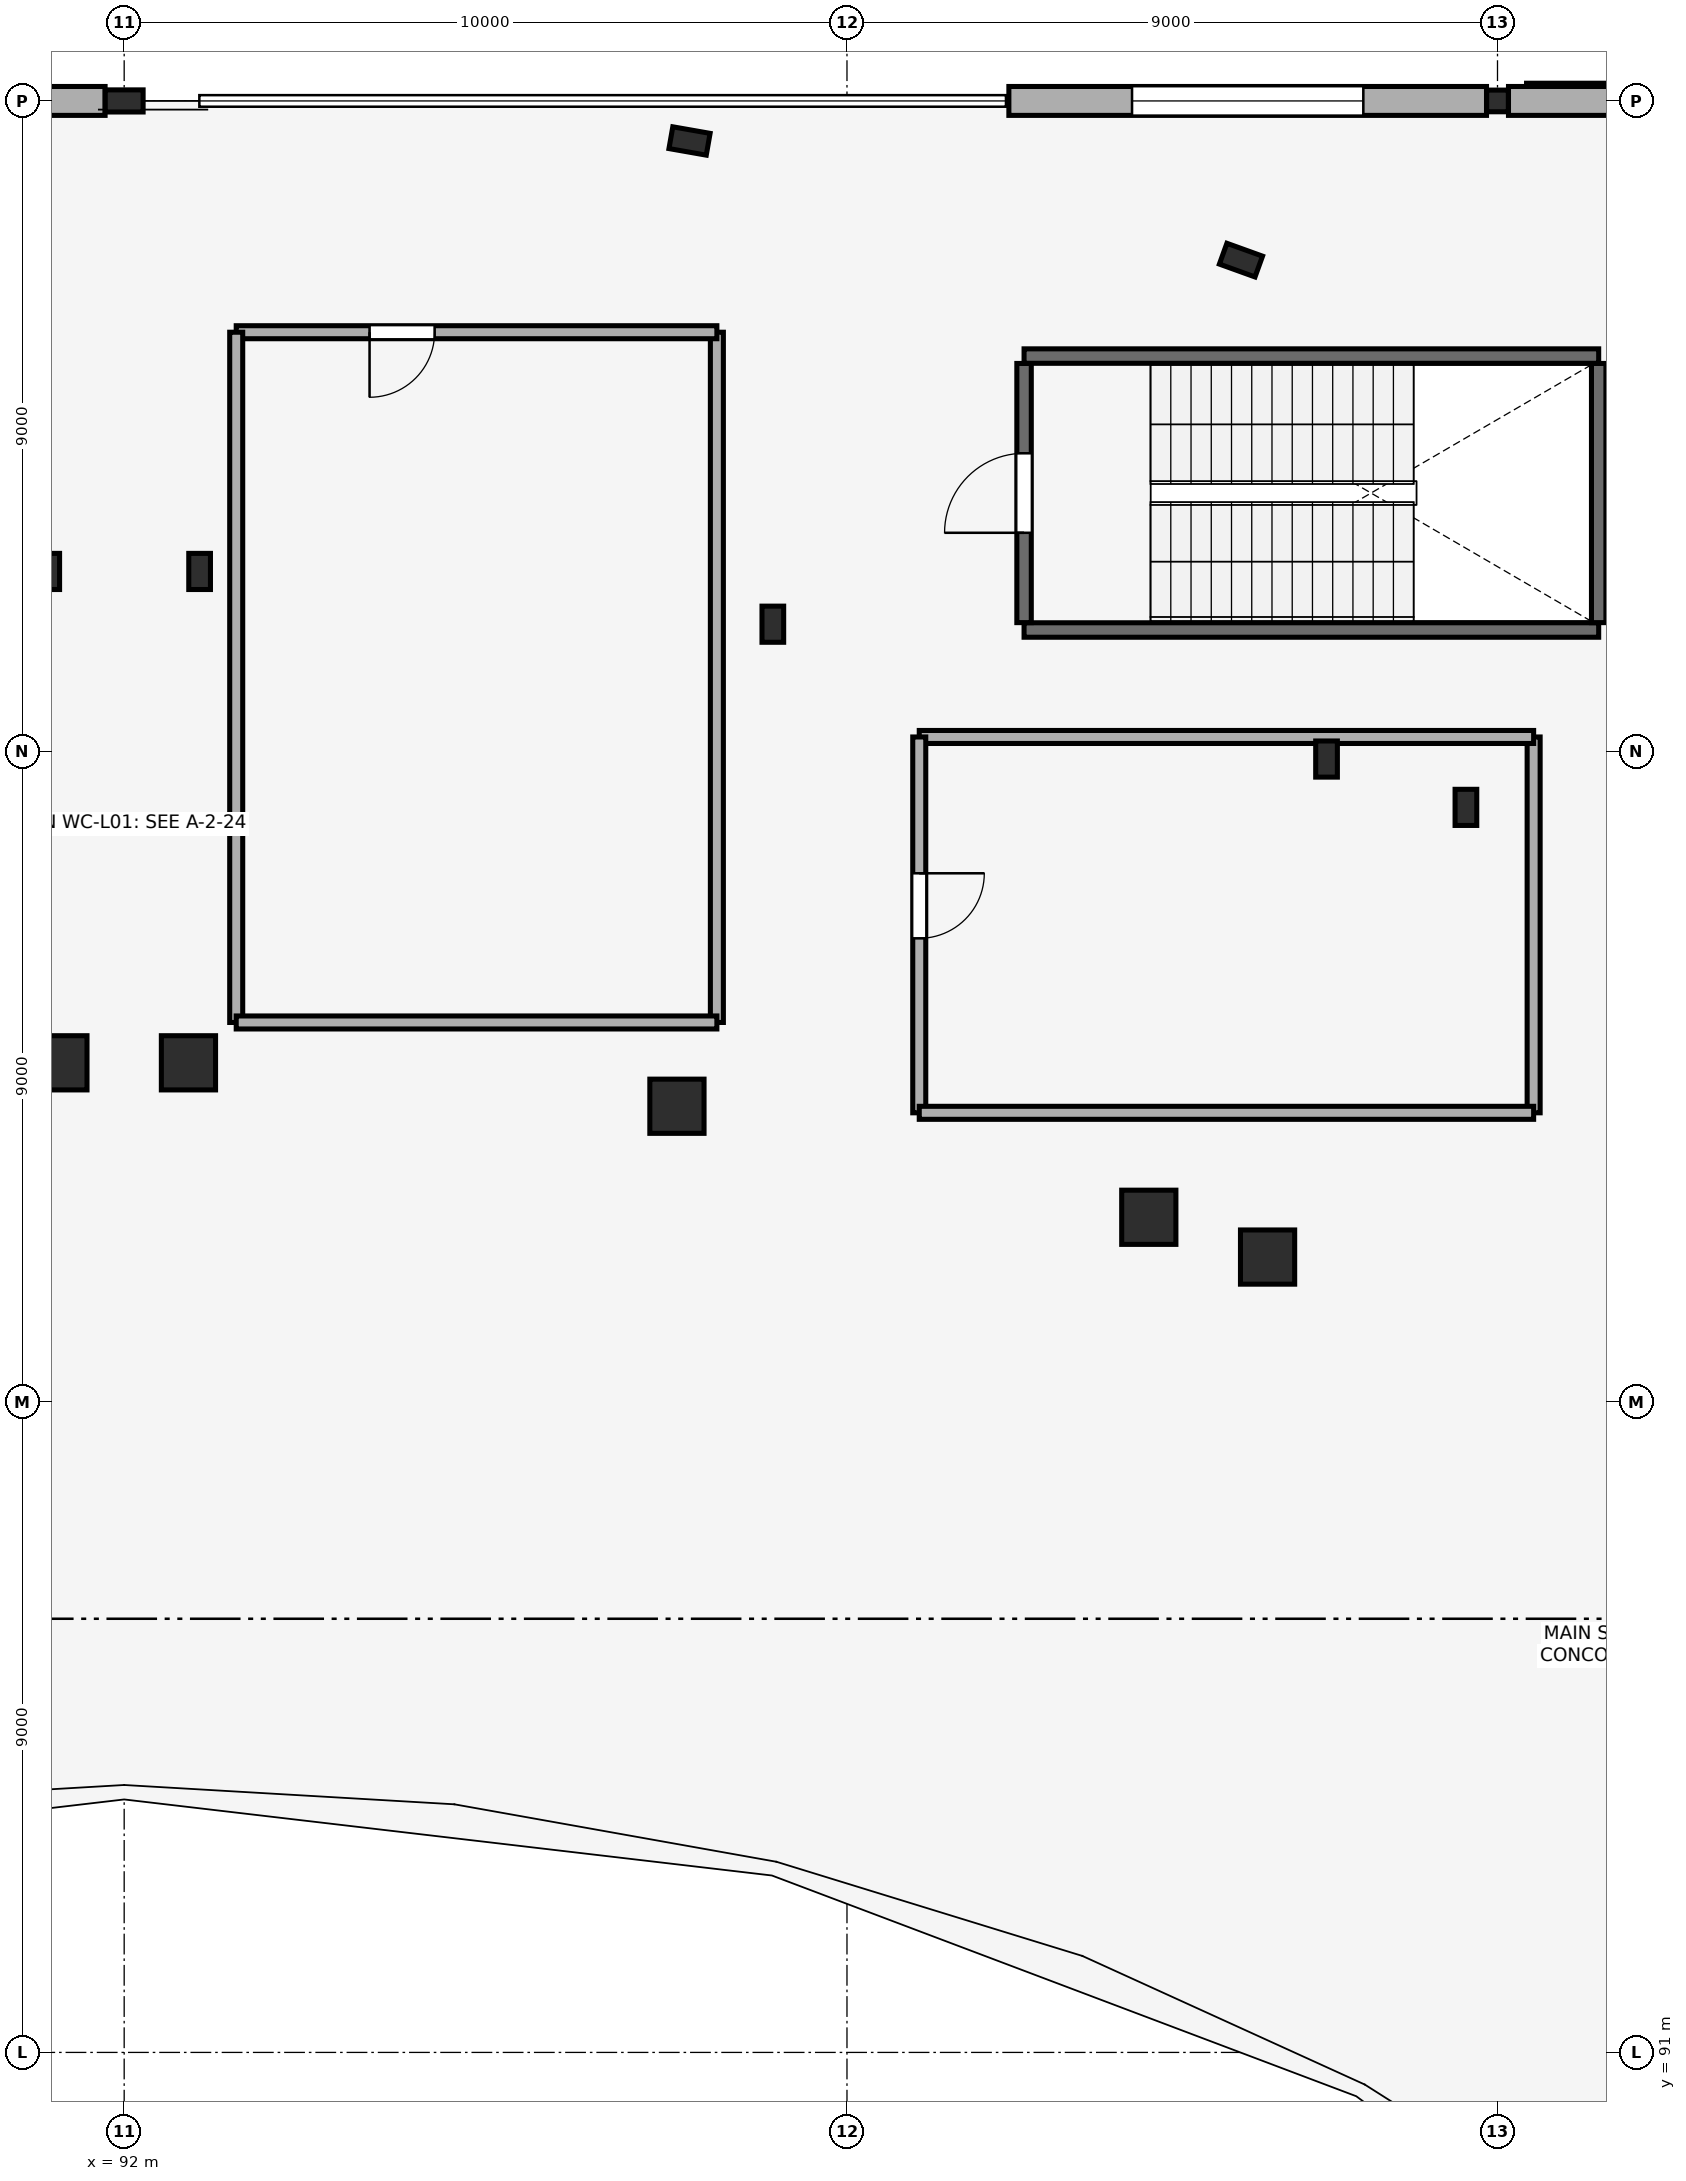
"""IFC4 building model, lengths in metres.
Left out: names, types, materials, properties, quantities, classifications, styles, units other than length and angle.
Written with IfcOpenShell. Run it as: python <this file> out.ifc"""

import sys

from ifc_helpers import new_model, si_unit, direction, frame, frame_2d, origin, origin_2d, place, context, subcontext, project, spatial, rectangle, hollow_rectangle, i_section, extrude, element, fill, save


model = new_model("IFC4")
c1 = context("Model", 3, precision=1e-05, world=origin(), true_north=direction((0.0, 1.0)))
c2 = subcontext(c1, "Body", "Model", "MODEL_VIEW")
j1 = project(units=[si_unit("LENGTHUNIT", "METRE"), si_unit("PLANEANGLEUNIT", "RADIAN")], contexts=[c1])
p1 = place(None, origin())
s1 = spatial("IfcSite", under=j1, at=p1, CompositionType="ELEMENT")
p2 = place(p1, origin())
s2 = spatial("IfcBuilding", under=s1, at=p2, CompositionType="ELEMENT")
p3 = place(p2, frame((0.0, 0.0, 5.4)))
s3 = spatial("IfcBuildingStorey", under=s2, at=p3, CompositionType="ELEMENT", Elevation=5.4)
for number, where, z_axis, x_axis in (
    (1, (107.451, 115.798, 0.0), (0.0, 0.0, 1.0), (0.34, 0.941, 0.0)),
    (2, (99.822, 117.446, 0.0), (0.0, 0.0, 1.0), (0.173, 0.985, 0.0)),
    (3, (92.0, 118.0, 0.0), (0.0, 0.0, 1.0), (0.0, 1.0, 0.0)),
):
    element("IfcColumn", number, at=place(p3, frame(where, z_axis=z_axis, x_axis=x_axis)), inside=s3, PredefinedType="COLUMN", context=c2, shape_type="SweptSolid", body=[
        extrude(i_section(OverallWidth=0.306, OverallDepth=0.524, WebThickness=0.021, FlangeThickness=0.04, FilletRadius=0.027, at=origin_2d()), origin(), (0.0, 0.0, 1.0), 4.8),
    ])
p4 = place(p3, frame((107.819, 102.004, 0.0), z_axis=(0.0, 0.0, 1.0), x_axis=(1.0, 0.0, 0.0)))
e4 = element("IfcColumn", 4, at=p4, inside=s3, PredefinedType="COLUMN", context=c2, shape_type="SweptSolid", body=[
    extrude(rectangle(XDim=0.75, YDim=0.75, at=origin_2d()), origin(), (0.0, 0.0, 1.0), 4.8),
])
p5 = place(p3, frame((110.563, 108.226, 0.0), z_axis=(0.0, 0.0, 1.0), x_axis=(1.0, 0.0, 0.0)))
e5 = element("IfcColumn", 5, at=p5, inside=s3, PredefinedType="COLUMN", context=c2, shape_type="SweptSolid", body=[
    extrude(i_section(OverallWidth=0.3, OverallDepth=0.5, WebThickness=0.014, FlangeThickness=0.028, FilletRadius=0.027, at=origin_2d()), origin(), (0.0, 0.0, 1.0), 4.8),
])
p6 = place(p3, frame((106.176, 102.555, 0.0), z_axis=(0.0, 0.0, 1.0), x_axis=(1.0, 0.0, 0.0)))
e6 = element("IfcColumn", 6, at=p6, inside=s3, PredefinedType="COLUMN", context=c2, shape_type="SweptSolid", body=[
    extrude(rectangle(XDim=0.75, YDim=0.75, at=origin_2d()), origin(), (0.0, 0.0, 1.0), 4.8),
])
p7 = place(p3, frame((108.635, 108.895, 0.0), z_axis=(0.0, 0.0, 1.0), x_axis=(1.0, 0.0, 0.0)))
e7 = element("IfcColumn", 7, at=p7, inside=s3, PredefinedType="COLUMN", context=c2, shape_type="SweptSolid", body=[
    extrude(i_section(OverallWidth=0.3, OverallDepth=0.5, WebThickness=0.014, FlangeThickness=0.028, FilletRadius=0.027, at=origin_2d()), origin(), (0.0, 0.0, 1.0), 4.8),
])
p8 = place(p3, frame((92.889, 104.692, 0.0), z_axis=(0.0, 0.0, 1.0), x_axis=(1.0, 0.0, 0.0)))
e8 = element("IfcColumn", 8, at=p8, inside=s3, PredefinedType="COLUMN", context=c2, shape_type="SweptSolid", body=[
    extrude(rectangle(XDim=0.75, YDim=0.75, at=origin_2d()), origin(), (0.0, 0.0, 1.0), 4.8),
])
p9 = place(p3, frame((93.044, 111.49, 0.0), z_axis=(0.0, 0.0, 1.0), x_axis=(1.0, 0.0, 0.0)))
e9 = element("IfcColumn", 9, at=p9, inside=s3, PredefinedType="COLUMN", context=c2, shape_type="SweptSolid", body=[
    extrude(i_section(OverallWidth=0.3, OverallDepth=0.5, WebThickness=0.014, FlangeThickness=0.028, FilletRadius=0.027, at=origin_2d()), origin(), (0.0, 0.0, 1.0), 4.8),
])
p10 = place(p3, frame((91.111, 104.692, 0.0), z_axis=(0.0, 0.0, 1.0), x_axis=(1.0, 0.0, 0.0)))
e10 = element("IfcColumn", 10, at=p10, inside=s3, PredefinedType="COLUMN", context=c2, shape_type="SweptSolid", body=[
    extrude(rectangle(XDim=0.75, YDim=0.75, at=origin_2d()), origin(), (0.0, 0.0, 1.0), 4.8),
])
p11 = place(p3, frame((90.956, 111.49, 0.0), z_axis=(0.0, 0.0, 1.0), x_axis=(1.0, 0.0, 0.0)))
e11 = element("IfcColumn", 11, at=p11, inside=s3, PredefinedType="COLUMN", context=c2, shape_type="SweptSolid", body=[
    extrude(i_section(OverallWidth=0.3, OverallDepth=0.5, WebThickness=0.014, FlangeThickness=0.028, FilletRadius=0.027, at=origin_2d()), origin(), (0.0, 0.0, 1.0), 4.8),
])
p12 = place(p3, frame((111.0, 118.0, 0.0), z_axis=(0.0, 0.0, 1.0), x_axis=(1.0, 0.0, 0.0)))
e12 = element("IfcColumn", 12, at=p12, inside=s3, PredefinedType="COLUMN", context=c2, shape_type="SweptSolid", body=[
    extrude(hollow_rectangle(XDim=0.3, YDim=0.3, WallThickness=0.012, at=origin_2d()), origin(), (0.0, 0.0, 1.0), 4.8),
])
p13 = place(p3, frame((99.647, 104.091, 0.0), z_axis=(0.0, 0.0, 1.0), x_axis=(1.0, 0.0, 0.0)))
e13 = element("IfcColumn", 13, at=p13, inside=s3, PredefinedType="COLUMN", context=c2, shape_type="SweptSolid", body=[
    extrude(rectangle(XDim=0.75, YDim=0.75, at=origin_2d()), origin(), (0.0, 0.0, 1.0), 4.8),
])
p14 = place(p3, frame((100.974, 110.76, 0.0), z_axis=(0.0, 0.0, 1.0), x_axis=(1.0, 0.0, 0.0)))
e14 = element("IfcColumn", 14, at=p14, inside=s3, PredefinedType="COLUMN", context=c2, shape_type="SweptSolid", body=[
    extrude(i_section(OverallWidth=0.3, OverallDepth=0.5, WebThickness=0.014, FlangeThickness=0.028, FilletRadius=0.027, at=origin_2d()), origin(), (0.0, 0.0, 1.0), 4.8),
])
p15 = place(p3, frame((81.76, 118.0, 0.0), z_axis=(0.0, 0.0, 1.0), x_axis=(1.0, 0.0, 0.0)))
e15 = element("IfcWall", 15, at=p15, inside=s3, PredefinedType="STANDARD", context=c2, shape_type="SweptSolid", body=[
    extrude(rectangle(XDim=9.976, YDim=0.4, at=frame_2d((4.988, 0.0))), origin(), (0.0, 0.0, 1.0), 3.832),
])
p16 = place(p15, frame((3.388, 0.0, 0.95)))
e16 = element("IfcOpeningElement", 16, at=p16, cuts=e15, PredefinedType="OPENING", context=c2, shape_type="SweptSolid", body=[
    extrude(rectangle(XDim=3.2, YDim=1.8, at=frame_2d((1.6, 0.9))), frame((0.0, 0.21, 0.0), z_axis=(0.0, -1.0, 0.0), x_axis=(1.0, 0.0, 0.0)), (0.0, 0.0, 1.0), 0.42),
])
p17 = place(p3, frame((104.24, 118.0, 0.0), z_axis=(0.0, 0.0, 1.0), x_axis=(1.0, 0.0, 0.0)))
e17 = element("IfcWall", 17, at=p17, inside=s3, PredefinedType="STANDARD", context=c2, shape_type="SweptSolid", body=[
    extrude(rectangle(XDim=6.608, YDim=0.4, at=frame_2d((3.304, 0.0))), origin(), (0.0, 0.0, 1.0), 4.52),
])
p18 = place(p17, frame((1.704, 0.0, 0.95)))
e18 = element("IfcOpeningElement", 18, at=p18, cuts=e17, PredefinedType="OPENING", context=c2, shape_type="SweptSolid", body=[
    extrude(rectangle(XDim=3.2, YDim=1.8, at=frame_2d((1.6, 0.9))), frame((0.0, 0.21, 0.0), z_axis=(0.0, -1.0, 0.0), x_axis=(1.0, 0.0, 0.0)), (0.0, 0.0, 1.0), 0.42),
])
p19 = place(p3, frame((111.152, 118.0, 0.0), z_axis=(0.0, 0.0, 1.0), x_axis=(1.0, 0.0, 0.0)))
e19 = element("IfcWall", 19, at=p19, inside=s3, PredefinedType="STANDARD", context=c2, shape_type="SweptSolid", body=[
    extrude(rectangle(XDim=4.051, YDim=0.4, at=frame_2d((2.025, 0.0))), origin(), (0.0, 0.0, 1.0), 4.52),
])
p20 = place(p3, frame((104.45, 110.68, 0.0), z_axis=(0.0, 0.0, 1.0), x_axis=(1.0, 0.0, 0.0)))
e20 = element("IfcWall", 20, at=p20, inside=s3, PredefinedType="SHEAR", context=c2, shape_type="SweptSolid", body=[
    extrude(rectangle(XDim=7.95, YDim=0.2, at=frame_2d((3.975, 0.0))), origin(), (0.0, 0.0, 1.0), 4.8),
])
p21 = place(p3, frame((104.45, 110.782, 0.0), z_axis=(0.0, 0.0, 1.0), x_axis=(0.0, 1.0, 0.0)))
e21 = element("IfcWall", 21, at=p21, inside=s3, PredefinedType="SHEAR", context=c2, shape_type="SweptSolid", body=[
    extrude(rectangle(XDim=3.586, YDim=0.2, at=frame_2d((1.793, 0.0))), origin(), (0.0, 0.0, 1.0), 4.8),
])
p22 = place(p21, frame((1.243, 0.0, 0.0)))
e22 = element("IfcOpeningElement", 22, at=p22, cuts=e21, PredefinedType="OPENING", context=c2, shape_type="SweptSolid", body=[
    extrude(rectangle(XDim=1.1, YDim=2.15, at=frame_2d((0.55, 1.075))), frame((0.0, 0.11, 0.0), z_axis=(0.0, -1.0, 0.0), x_axis=(1.0, 0.0, 0.0)), (0.0, 0.0, 1.0), 0.22),
])
p23 = place(p3, frame((112.4, 110.782, 0.0), z_axis=(0.0, 0.0, 1.0), x_axis=(0.0, 1.0, 0.0)))
e23 = element("IfcWall", 23, at=p23, inside=s3, PredefinedType="SHEAR", context=c2, shape_type="SweptSolid", body=[
    extrude(rectangle(XDim=3.586, YDim=0.2, at=frame_2d((1.793, 0.0))), origin(), (0.0, 0.0, 1.0), 4.8),
])
p24 = place(p3, frame((104.45, 114.47, 0.0), z_axis=(0.0, 0.0, 1.0), x_axis=(1.0, 0.0, 0.0)))
e24 = element("IfcWall", 24, at=p24, inside=s3, PredefinedType="SHEAR", context=c2, shape_type="SweptSolid", body=[
    extrude(rectangle(XDim=7.95, YDim=0.2, at=frame_2d((3.975, 0.0))), origin(), (0.0, 0.0, 1.0), 4.8),
])
p25 = place(p3, frame((100.2, 105.25, 0.0), z_axis=(0.0, 0.0, 1.0), x_axis=(0.0, 1.0, 0.0)))
e25 = element("IfcWall", 25, at=p25, inside=s3, PredefinedType="PARTITIONING", context=c2, shape_type="SweptSolid", body=[
    extrude(rectangle(XDim=9.55, YDim=0.18, at=frame_2d((4.775, 0.0))), origin(), (0.0, 0.0, 1.0), 4.52),
])
p26 = place(p3, frame((100.2, 114.8, 0.0), z_axis=(0.0, 0.0, 1.0), x_axis=(-1.0, 0.0, 0.0)))
e26 = element("IfcWall", 26, at=p26, inside=s3, PredefinedType="PARTITIONING", context=c2, shape_type="SweptSolid", body=[
    extrude(rectangle(XDim=6.65, YDim=0.18, at=frame_2d((3.325, 0.0))), origin(), (0.0, 0.0, 1.0), 4.52),
])
p27 = place(p26, frame((3.905, 0.0, 0.0)))
e27 = element("IfcOpeningElement", 27, at=p27, cuts=e26, PredefinedType="OPENING", context=c2, shape_type="SweptSolid", body=[
    extrude(rectangle(XDim=0.9, YDim=2.1, at=frame_2d((0.45, 1.05))), frame((0.0, 0.1, 0.0), z_axis=(0.0, -1.0, 0.0), x_axis=(1.0, 0.0, 0.0)), (0.0, 0.0, 1.0), 0.2),
])
p28 = place(p3, frame((93.55, 114.8, 0.0), z_axis=(0.0, 0.0, 1.0), x_axis=(0.0, -1.0, 0.0)))
e28 = element("IfcWall", 28, at=p28, inside=s3, PredefinedType="PARTITIONING", context=c2, shape_type="SweptSolid", body=[
    extrude(rectangle(XDim=9.55, YDim=0.18, at=frame_2d((4.775, 0.0))), origin(), (0.0, 0.0, 1.0), 4.52),
])
p29 = place(p3, frame((93.55, 105.25, 0.0), z_axis=(0.0, 0.0, 1.0), x_axis=(1.0, 0.0, 0.0)))
e29 = element("IfcWall", 29, at=p29, inside=s3, PredefinedType="PARTITIONING", context=c2, shape_type="SweptSolid", body=[
    extrude(rectangle(XDim=6.65, YDim=0.18, at=frame_2d((3.325, 0.0))), origin(), (0.0, 0.0, 1.0), 4.52),
])
p30 = place(p3, frame((111.5, 104.0, 0.0), z_axis=(0.0, 0.0, 1.0), x_axis=(0.0, 1.0, 0.0)))
e30 = element("IfcWall", 30, at=p30, inside=s3, PredefinedType="PARTITIONING", context=c2, shape_type="SweptSolid", body=[
    extrude(rectangle(XDim=5.2, YDim=0.18, at=frame_2d((2.6, 0.0))), origin(), (0.0, 0.0, 1.0), 4.52),
])
p31 = place(p3, frame((111.5, 109.2, 0.0), z_axis=(0.0, 0.0, 1.0), x_axis=(-1.0, 0.0, 0.0)))
e31 = element("IfcWall", 31, at=p31, inside=s3, PredefinedType="PARTITIONING", context=c2, shape_type="SweptSolid", body=[
    extrude(rectangle(XDim=8.5, YDim=0.18, at=frame_2d((4.25, 0.0))), origin(), (0.0, 0.0, 1.0), 3.905),
])
p32 = place(p3, frame((103.0, 109.2, 0.0), z_axis=(0.0, 0.0, 1.0), x_axis=(0.0, -1.0, 0.0)))
e32 = element("IfcWall", 32, at=p32, inside=s3, PredefinedType="PARTITIONING", context=c2, shape_type="SweptSolid", body=[
    extrude(rectangle(XDim=5.2, YDim=0.18, at=frame_2d((2.6, 0.0))), origin(), (0.0, 0.0, 1.0), 4.52),
])
p33 = place(p32, frame((1.886, 0.0, 0.0)))
e33 = element("IfcOpeningElement", 33, at=p33, cuts=e32, PredefinedType="OPENING", context=c2, shape_type="SweptSolid", body=[
    extrude(rectangle(XDim=0.9, YDim=2.1, at=frame_2d((0.45, 1.05))), frame((0.0, 0.1, 0.0), z_axis=(0.0, -1.0, 0.0), x_axis=(1.0, 0.0, 0.0)), (0.0, 0.0, 1.0), 0.2),
])
p34 = place(p3, frame((103.0, 104.0, 0.0), z_axis=(0.0, 0.0, 1.0), x_axis=(1.0, 0.0, 0.0)))
e34 = element("IfcWall", 34, at=p34, inside=s3, PredefinedType="PARTITIONING", context=c2, shape_type="SweptSolid", body=[
    extrude(rectangle(XDim=8.5, YDim=0.18, at=frame_2d((4.25, 0.0))), origin(), (0.0, 0.0, 1.0), 4.52),
])
p35 = place(p18, origin())
e35 = element("IfcWindow", 35, at=p35, inside=s3, PartitioningType="SINGLE_PANEL", PredefinedType="WINDOW", context=c2, shape_type="SweptSolid", body=[
    extrude(rectangle(XDim=3.2, YDim=1.8, at=frame_2d((1.6, 0.9))), frame((0.0, 0.03, 0.0), z_axis=(0.0, -1.0, 0.0), x_axis=(1.0, 0.0, 0.0)), (0.0, 0.0, 1.0), 0.06),
])
fill(e18, e35)
p36 = place(p22, frame((1.1, 0.0, 0.0), z_axis=(0.0, 0.0, 1.0), x_axis=(-1.0, 0.0, 0.0)))
e36 = element("IfcDoor", 36, at=p36, inside=s3, OperationType="SINGLE_SWING_RIGHT", PredefinedType="DOOR", context=c2, shape_type="SweptSolid", body=[
    extrude(rectangle(XDim=1.1, YDim=2.15, at=frame_2d((0.55, 1.075))), frame((0.0, 0.025, 0.0), z_axis=(0.0, -1.0, 0.0), x_axis=(1.0, 0.0, 0.0)), (0.0, 0.0, 1.0), 0.05),
])
fill(e22, e36)
p37 = place(p27, origin())
e37 = element("IfcDoor", 37, at=p37, inside=s3, OperationType="SINGLE_SWING_RIGHT", PredefinedType="DOOR", context=c2, shape_type="SweptSolid", body=[
    extrude(rectangle(XDim=0.9, YDim=2.1, at=frame_2d((0.45, 1.05))), frame((0.0, 0.025, 0.0), z_axis=(0.0, -1.0, 0.0), x_axis=(1.0, 0.0, 0.0)), (0.0, 0.0, 1.0), 0.05),
])
fill(e27, e37)
p38 = place(p33, origin())
e38 = element("IfcDoor", 38, at=p38, inside=s3, OperationType="SINGLE_SWING_LEFT", PredefinedType="DOOR", context=c2, shape_type="SweptSolid", body=[
    extrude(rectangle(XDim=0.9, YDim=2.1, at=frame_2d((0.45, 1.05))), frame((0.0, 0.025, 0.0), z_axis=(0.0, -1.0, 0.0), x_axis=(1.0, 0.0, 0.0)), (0.0, 0.0, 1.0), 0.05),
])
fill(e33, e38)
save(model, sys.argv[1])
